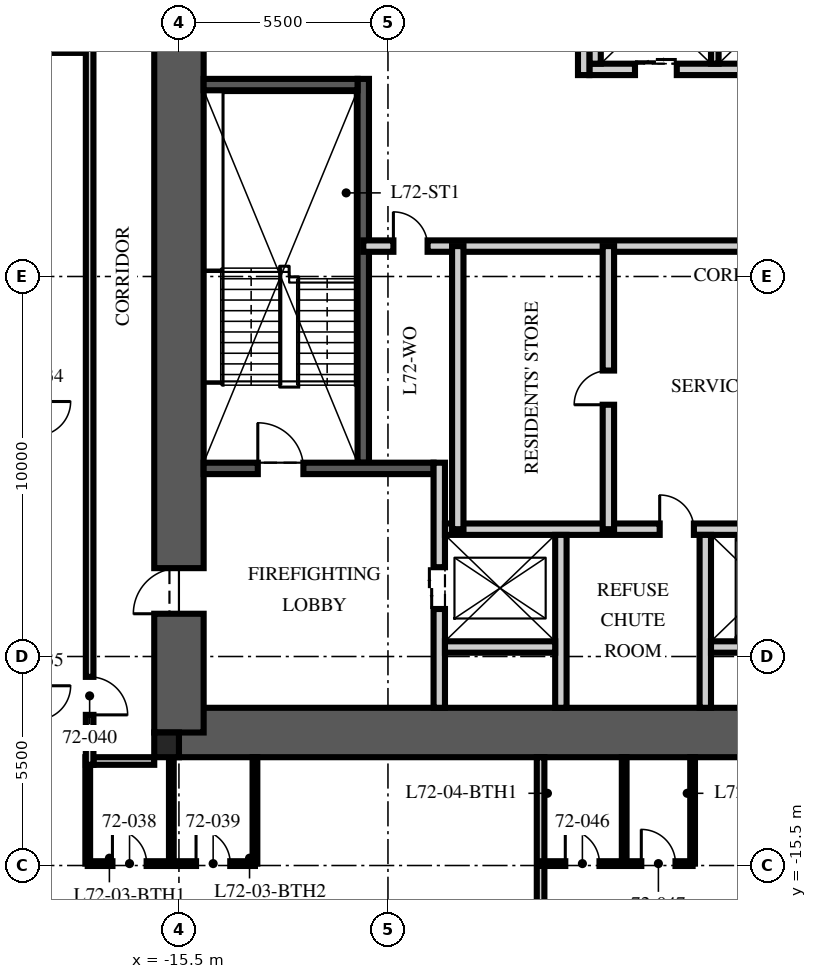
"""IFC4 building model, lengths in metres.
Left out: names, types, materials, properties, quantities, classifications, styles, units other than length and angle.
Written with IfcOpenShell. Run it as: python <this file> out.ifc"""

import sys

from ifc_helpers import new_model, si_unit, direction, frame, frame_2d, origin, origin_2d, place, context, subcontext, project, spatial, rectangle, extrude, element, fill, save


model = new_model("IFC4")
c1 = context("Model", 3, precision=1e-05, world=origin(), true_north=direction((0.0, 1.0)))
c2 = subcontext(c1, "Body", "Model", "MODEL_VIEW")
j1 = project(units=[si_unit("LENGTHUNIT", "METRE"), si_unit("PLANEANGLEUNIT", "RADIAN")], contexts=[c1])
p1 = place(None, origin())
s1 = spatial("IfcSite", under=j1, at=p1, CompositionType="ELEMENT")
p2 = place(p1, origin())
s2 = spatial("IfcBuilding", under=s1, at=p2, CompositionType="ELEMENT")
p3 = place(p2, frame((0.0, 0.0, 289.5)))
s3 = spatial("IfcBuildingStorey", under=s2, at=p3, CompositionType="ELEMENT", Elevation=289.5)
p4 = place(p3, frame((-15.5, -12.0, -0.25), z_axis=(0.0, 0.0, 1.0), x_axis=(1.0, 0.0, 0.0)))
e1 = element("IfcWall", 1, at=p4, inside=s3, PredefinedType="SHEAR", context=c2, shape_type="SweptSolid", body=[
    extrude(rectangle(XDim=31.0, YDim=1.3, at=frame_2d((15.5, 0.0))), origin(), (0.0, 0.0, 1.0), 3.75),
])
p5 = place(p3, frame((-15.5, -12.0, -0.25), z_axis=(0.0, 0.0, 1.0), x_axis=(0.0, 1.0, 0.0)))
e2 = element("IfcWall", 2, at=p5, inside=s3, PredefinedType="SHEAR", context=c2, shape_type="SweptSolid", body=[
    extrude(rectangle(XDim=24.0, YDim=1.3, at=frame_2d((12.0, 0.0))), origin(), (0.0, 0.0, 1.0), 3.75),
])
p6 = place(p5, frame((3.125, 0.0, 0.25)))
e3 = element("IfcOpeningElement", 3, at=p6, cuts=e2, PredefinedType="OPENING", context=c2, shape_type="SweptSolid", body=[
    extrude(rectangle(XDim=1.2, YDim=2.1, at=frame_2d((0.6, 1.05))), frame((0.0, 0.66, 0.0), z_axis=(0.0, -1.0, 0.0), x_axis=(1.0, 0.0, 0.0)), (0.0, 0.0, 1.0), 1.32),
])
p7 = place(p5, frame((19.375, 0.0, 0.25)))
e4 = element("IfcOpeningElement", 4, at=p7, cuts=e2, PredefinedType="OPENING", context=c2, shape_type="SweptSolid", body=[
    extrude(rectangle(XDim=1.8, YDim=2.1, at=frame_2d((0.9, 1.05))), frame((0.0, 0.66, 0.0), z_axis=(0.0, -1.0, 0.0), x_axis=(1.0, 0.0, 0.0)), (0.0, 0.0, 1.0), 1.32),
])
p8 = place(p3, frame((-15.825, -12.325, -0.25), z_axis=(0.0, 0.0, 1.0), x_axis=(1.0, 0.0, 0.0)))
e5 = element("IfcColumn", 5, at=p8, inside=s3, PredefinedType="COLUMN", context=c2, shape_type="SweptSolid", body=[
    extrude(rectangle(XDim=0.65, YDim=0.65, at=origin_2d()), origin(), (0.0, 0.0, 1.0), 3.75),
])
p9 = place(p3, frame((-10.65, -4.9, 0.0), z_axis=(0.0, 0.0, 1.0), x_axis=(0.0, 1.0, 0.0)))
e6 = element("IfcWall", 6, at=p9, inside=s3, PredefinedType="SOLIDWALL", context=c2, shape_type="SweptSolid", body=[
    extrude(rectangle(XDim=10.1, YDim=0.3, at=frame_2d((5.05, 0.0))), origin(), (0.0, 0.0, 1.0), 3.5),
])
p10 = place(p3, frame((-14.85, -5.05, 0.0), z_axis=(0.0, 0.0, 1.0), x_axis=(1.0, 0.0, 0.0)))
e7 = element("IfcWall", 7, at=p10, inside=s3, PredefinedType="SOLIDWALL", context=c2, shape_type="SweptSolid", body=[
    extrude(rectangle(XDim=6.05, YDim=0.3, at=frame_2d((3.025, 0.0))), origin(), (0.0, 0.0, 1.0), 3.5),
])
p11 = place(p10, frame((1.425, 0.0, 0.0)))
e8 = element("IfcOpeningElement", 8, at=p11, cuts=e7, PredefinedType="OPENING", context=c2, shape_type="SweptSolid", body=[
    extrude(rectangle(XDim=1.2, YDim=2.1, at=frame_2d((0.6, 1.05))), frame((0.0, 0.16, 0.0), z_axis=(0.0, -1.0, 0.0), x_axis=(1.0, 0.0, 0.0)), (0.0, 0.0, 1.0), 0.32),
])
p12 = place(p3, frame((-14.85, 5.05, 0.0), z_axis=(0.0, 0.0, 1.0), x_axis=(1.0, 0.0, 0.0)))
e9 = element("IfcWall", 9, at=p12, inside=s3, PredefinedType="SOLIDWALL", context=c2, shape_type="SweptSolid", body=[
    extrude(rectangle(XDim=4.05, YDim=0.3, at=frame_2d((2.025, 0.0))), origin(), (0.0, 0.0, 1.0), 3.5),
])
p13 = place(p3, frame((-8.65, -11.35, 0.0), z_axis=(0.0, 0.0, 1.0), x_axis=(0.0, 1.0, 0.0)))
e10 = element("IfcWall", 10, at=p13, inside=s3, PredefinedType="PARTITIONING", context=c2, shape_type="SweptSolid", body=[
    extrude(rectangle(XDim=6.45, YDim=0.3, at=frame_2d((3.225, 0.0))), origin(), (0.0, 0.0, 1.0), 3.5),
])
p14 = place(p13, frame((2.6, 0.0, 0.0)))
e11 = element("IfcOpeningElement", 11, at=p14, cuts=e10, PredefinedType="OPENING", context=c2, shape_type="SweptSolid", body=[
    extrude(rectangle(XDim=1.1, YDim=2.1, at=frame_2d((0.55, 1.05))), frame((0.0, 0.16, 0.0), z_axis=(0.0, -1.0, 0.0), x_axis=(1.0, 0.0, 0.0)), (0.0, 0.0, 1.0), 0.32),
])
p15 = place(p3, frame((-8.5, -6.65, 0.0), z_axis=(0.0, 0.0, 1.0), x_axis=(1.0, 0.0, 0.0)))
e12 = element("IfcWall", 12, at=p15, inside=s3, PredefinedType="PARTITIONING", context=c2, shape_type="SweptSolid", body=[
    extrude(rectangle(XDim=17.0, YDim=0.3, at=frame_2d((8.5, 0.0))), origin(), (0.0, 0.0, 1.0), 3.5),
])
p16 = place(p15, frame((7.8, 0.0, 0.0)))
e13 = element("IfcOpeningElement", 13, at=p16, cuts=e12, PredefinedType="OPENING", context=c2, shape_type="SweptSolid", body=[
    extrude(rectangle(XDim=1.3, YDim=2.4, at=frame_2d((0.65, 1.2))), frame((0.0, 0.16, 0.0), z_axis=(0.0, -1.0, 0.0), x_axis=(1.0, 0.0, 0.0)), (0.0, 0.0, 1.0), 0.32),
])
p17 = place(p15, frame((5.65, 0.0, 0.0)))
e14 = element("IfcOpeningElement", 14, at=p17, cuts=e12, PredefinedType="OPENING", context=c2, shape_type="SweptSolid", body=[
    extrude(rectangle(XDim=0.9, YDim=2.1, at=frame_2d((0.45, 1.05))), frame((0.0, 0.16, 0.0), z_axis=(0.0, -1.0, 0.0), x_axis=(1.0, 0.0, 0.0)), (0.0, 0.0, 1.0), 0.32),
])
p18 = place(p15, frame((10.4, 0.0, 0.0)))
e15 = element("IfcOpeningElement", 15, at=p18, cuts=e12, PredefinedType="OPENING", context=c2, shape_type="SweptSolid", body=[
    extrude(rectangle(XDim=0.9, YDim=2.1, at=frame_2d((0.45, 1.05))), frame((0.0, 0.16, 0.0), z_axis=(0.0, -1.0, 0.0), x_axis=(1.0, 0.0, 0.0)), (0.0, 0.0, 1.0), 0.32),
])
for number, where, z_axis, x_axis in (
    (16, (-5.45, -11.35, 0.0), (0.0, 0.0, 1.0), (0.0, 1.0, 0.0)),
    (17, (-1.65, -11.35, 0.0), (0.0, 0.0, 1.0), (0.0, 1.0, 0.0)),
):
    element("IfcWall", number, at=place(p3, frame(where, z_axis=z_axis, x_axis=x_axis)), inside=s3, PredefinedType="PARTITIONING", context=c2, shape_type="SweptSolid", body=[
        extrude(rectangle(XDim=4.55, YDim=0.3, at=frame_2d((2.275, 0.0))), origin(), (0.0, 0.0, 1.0), 3.5),
    ])
for number, where, z_axis, x_axis in (
    (18, (-8.5, -9.75, 0.0), (0.0, 0.0, 1.0), (1.0, 0.0, 0.0)),
    (19, (-1.5, -9.75, 0.0), (0.0, 0.0, 1.0), (1.0, 0.0, 0.0)),
):
    element("IfcWall", number, at=place(p3, frame(where, z_axis=z_axis, x_axis=x_axis)), inside=s3, PredefinedType="PARTITIONING", context=c2, shape_type="SweptSolid", body=[
        extrude(rectangle(XDim=2.9, YDim=0.3, at=frame_2d((1.45, 0.0))), origin(), (0.0, 0.0, 1.0), 3.5),
    ])
p19 = place(p3, frame((-4.7, 5.45, 0.0), z_axis=(0.0, 0.0, 1.0), x_axis=(1.0, 0.0, 0.0)))
e20 = element("IfcWall", 20, at=p19, inside=s3, PredefinedType="PARTITIONING", context=c2, shape_type="SweptSolid", body=[
    extrude(rectangle(XDim=9.7, YDim=0.3, at=frame_2d((4.85, 0.0))), origin(), (0.0, 0.0, 1.0), 3.5),
])
p20 = place(p19, frame((1.2, 0.0, 0.0)))
e21 = element("IfcOpeningElement", 21, at=p20, cuts=e20, PredefinedType="OPENING", context=c2, shape_type="SweptSolid", body=[
    extrude(rectangle(XDim=1.1, YDim=2.1, at=frame_2d((0.55, 1.05))), frame((0.0, 0.16, 0.0), z_axis=(0.0, -1.0, 0.0), x_axis=(1.0, 0.0, 0.0)), (0.0, 0.0, 1.0), 0.32),
])
p21 = place(p19, frame((4.3, 0.0, 0.0)))
e22 = element("IfcOpeningElement", 22, at=p21, cuts=e20, PredefinedType="OPENING", context=c2, shape_type="SweptSolid", body=[
    extrude(rectangle(XDim=1.1, YDim=2.1, at=frame_2d((0.55, 1.05))), frame((0.0, 0.16, 0.0), z_axis=(0.0, -1.0, 0.0), x_axis=(1.0, 0.0, 0.0)), (0.0, 0.0, 1.0), 0.32),
])
p22 = place(p19, frame((7.4, 0.0, 0.0)))
e23 = element("IfcOpeningElement", 23, at=p22, cuts=e20, PredefinedType="OPENING", context=c2, shape_type="SweptSolid", body=[
    extrude(rectangle(XDim=1.1, YDim=2.1, at=frame_2d((0.55, 1.05))), frame((0.0, 0.16, 0.0), z_axis=(0.0, -1.0, 0.0), x_axis=(1.0, 0.0, 0.0)), (0.0, 0.0, 1.0), 0.32),
])
p23 = place(p3, frame((-4.55, 5.6, 0.0), z_axis=(0.0, 0.0, 1.0), x_axis=(0.0, 1.0, 0.0)))
e24 = element("IfcWall", 24, at=p23, inside=s3, PredefinedType="PARTITIONING", context=c2, shape_type="SweptSolid", body=[
    extrude(rectangle(XDim=2.8, YDim=0.3, at=frame_2d((1.4, 0.0))), origin(), (0.0, 0.0, 1.0), 3.5),
])
p24 = place(p3, frame((-1.4, 5.6, 0.0), z_axis=(0.0, 0.0, 1.0), x_axis=(0.0, 1.0, 0.0)))
e25 = element("IfcWall", 25, at=p24, inside=s3, PredefinedType="PARTITIONING", context=c2, shape_type="SweptSolid", body=[
    extrude(rectangle(XDim=2.8, YDim=0.2, at=frame_2d((1.4, 0.0))), origin(), (0.0, 0.0, 1.0), 3.5),
])
p25 = place(p3, frame((-10.65, 0.8, 0.0), z_axis=(0.0, 0.0, 1.0), x_axis=(1.0, 0.0, 0.0)))
e26 = element("IfcWall", 26, at=p25, inside=s3, PredefinedType="PARTITIONING", context=c2, shape_type="SweptSolid", body=[
    extrude(rectangle(XDim=21.3, YDim=0.3, at=frame_2d((10.65, 0.0))), origin(), (0.0, 0.0, 1.0), 3.5),
])
p26 = place(p25, frame((10.05, 0.0, 0.0)))
e27 = element("IfcOpeningElement", 27, at=p26, cuts=e26, PredefinedType="OPENING", context=c2, shape_type="SweptSolid", body=[
    extrude(rectangle(XDim=1.2, YDim=2.1, at=frame_2d((0.6, 1.05))), frame((0.0, 0.16, 0.0), z_axis=(0.0, -1.0, 0.0), x_axis=(1.0, 0.0, 0.0)), (0.0, 0.0, 1.0), 0.32),
])
p27 = place(p25, frame((0.793, 0.0, 0.0)))
e28 = element("IfcOpeningElement", 28, at=p27, cuts=e26, PredefinedType="OPENING", context=c2, shape_type="SweptSolid", body=[
    extrude(rectangle(XDim=0.9, YDim=2.1, at=frame_2d((0.45, 1.05))), frame((0.0, 0.16, 0.0), z_axis=(0.0, -1.0, 0.0), x_axis=(1.0, 0.0, 0.0)), (0.0, 0.0, 1.0), 0.32),
])
p28 = place(p3, frame((-4.2, -6.65, 0.0), z_axis=(0.0, 0.0, 1.0), x_axis=(0.0, 1.0, 0.0)))
e29 = element("IfcWall", 29, at=p28, inside=s3, PredefinedType="PARTITIONING", context=c2, shape_type="SweptSolid", body=[
    extrude(rectangle(XDim=7.45, YDim=0.3, at=frame_2d((3.725, 0.0))), origin(), (0.0, 0.0, 1.0), 3.5),
])
p29 = place(p28, frame((3.275, 0.0, 0.0)))
e30 = element("IfcOpeningElement", 30, at=p29, cuts=e29, PredefinedType="OPENING", context=c2, shape_type="SweptSolid", body=[
    extrude(rectangle(XDim=0.9, YDim=2.1, at=frame_2d((0.45, 1.05))), frame((0.0, 0.16, 0.0), z_axis=(0.0, -1.0, 0.0), x_axis=(1.0, 0.0, 0.0)), (0.0, 0.0, 1.0), 0.32),
])
p30 = place(p3, frame((-8.163, -6.65, 0.0), z_axis=(0.0, 0.0, 1.0), x_axis=(0.0, 1.0, 0.0)))
e31 = element("IfcWall", 31, at=p30, inside=s3, PredefinedType="PARTITIONING", context=c2, shape_type="SweptSolid", body=[
    extrude(rectangle(XDim=7.45, YDim=0.3, at=frame_2d((3.725, 0.0))), origin(), (0.0, 0.0, 1.0), 3.5),
])
p31 = place(p3, frame((-4.85, 5.3, 0.0), z_axis=(0.0, 0.0, 1.0), x_axis=(0.0, 1.0, 0.0)))
e32 = element("IfcWall", 32, at=p31, inside=s3, PredefinedType="PARTITIONING", context=c2, shape_type="SweptSolid", body=[
    extrude(rectangle(XDim=6.05, YDim=0.3, at=frame_2d((3.025, 0.0))), origin(), (0.0, 0.0, 1.0), 3.5),
])
p32 = place(p31, frame((4.225, 0.0, 0.0)))
e33 = element("IfcOpeningElement", 33, at=p32, cuts=e32, PredefinedType="OPENING", context=c2, shape_type="SweptSolid", body=[
    extrude(rectangle(XDim=0.9, YDim=2.1, at=frame_2d((0.45, 1.05))), frame((0.0, 0.16, 0.0), z_axis=(0.0, -1.0, 0.0), x_axis=(1.0, 0.0, 0.0)), (0.0, 0.0, 1.0), 0.32),
])
p33 = place(p3, frame((-16.15, -12.75, 0.0), z_axis=(0.0, 0.0, 1.0), x_axis=(-1.0, 0.0, 0.0)))
e34 = element("IfcWall", 34, at=p33, inside=s3, PredefinedType="PARTITIONING", context=c2, shape_type="SweptSolid", body=[
    extrude(rectangle(XDim=1.6, YDim=0.2, at=frame_2d((0.8, 0.0))), origin(), (0.0, 0.0, 1.0), 2.6),
])
p34 = place(p3, frame((-17.95, 5.984, 0.0), z_axis=(0.0, 0.0, 1.0), x_axis=(-1.0, 0.0, 0.0)))
e35 = element("IfcWall", 35, at=p34, inside=s3, PredefinedType="PARTITIONING", context=c2, shape_type="SweptSolid", body=[
    extrude(rectangle(XDim=5.8, YDim=0.2, at=frame_2d((2.9, 0.0))), origin(), (0.0, 0.0, 1.0), 3.01),
])
p35 = place(p3, frame((-5.984, -12.65, 0.0), z_axis=(0.0, 0.0, 1.0), x_axis=(0.0, -1.0, 0.0)))
e36 = element("IfcWall", 36, at=p35, inside=s3, PredefinedType="PARTITIONING", context=c2, shape_type="SweptSolid", body=[
    extrude(rectangle(XDim=11.1, YDim=0.2, at=frame_2d((5.55, 0.0))), origin(), (0.0, 0.0, 1.0), 3.01),
])
p36 = place(p3, frame((-17.9, -15.45, 0.0), z_axis=(0.0, 0.0, 1.0), x_axis=(1.0, 0.0, 0.0)))
e37 = element("IfcWall", 37, at=p36, inside=s3, PredefinedType="PARTITIONING", context=c2, shape_type="SweptSolid", body=[
    extrude(rectangle(XDim=4.4, YDim=0.125, at=frame_2d((2.2, 0.0))), origin(), (0.0, 0.0, 1.0), 2.6),
])
p37 = place(p36, frame((0.65, 0.0, 0.0)))
e38 = element("IfcOpeningElement", 38, at=p37, cuts=e37, PredefinedType="OPENING", context=c2, shape_type="SweptSolid", body=[
    extrude(rectangle(XDim=0.9, YDim=2.1, at=frame_2d((0.45, 1.05))), frame((0.0, 0.073, 0.0), z_axis=(0.0, -1.0, 0.0), x_axis=(1.0, 0.0, 0.0)), (0.0, 0.0, 1.0), 0.145),
])
p38 = place(p36, frame((2.85, 0.0, 0.0)))
e39 = element("IfcOpeningElement", 39, at=p38, cuts=e37, PredefinedType="OPENING", context=c2, shape_type="SweptSolid", body=[
    extrude(rectangle(XDim=0.9, YDim=2.1, at=frame_2d((0.45, 1.05))), frame((0.0, 0.073, 0.0), z_axis=(0.0, -1.0, 0.0), x_axis=(1.0, 0.0, 0.0)), (0.0, 0.0, 1.0), 0.145),
])
p39 = place(p3, frame((-17.9, -12.65, 0.0), z_axis=(0.0, 0.0, 1.0), x_axis=(0.0, -1.0, 0.0)))
e40 = element("IfcWall", 40, at=p39, inside=s3, PredefinedType="PARTITIONING", context=c2, shape_type="SweptSolid", body=[
    extrude(rectangle(XDim=2.8, YDim=0.125, at=frame_2d((1.4, 0.0))), origin(), (0.0, 0.0, 1.0), 2.9),
])
p40 = place(p3, frame((-15.7, -12.65, 0.0), z_axis=(0.0, 0.0, 1.0), x_axis=(0.0, -1.0, 0.0)))
e41 = element("IfcWall", 41, at=p40, inside=s3, PredefinedType="PARTITIONING", context=c2, shape_type="SweptSolid", body=[
    extrude(rectangle(XDim=2.8, YDim=0.125, at=frame_2d((1.4, 0.0))), origin(), (0.0, 0.0, 1.0), 2.6),
])
p41 = place(p3, frame((-13.5, -12.65, 0.0), z_axis=(0.0, 0.0, 1.0), x_axis=(0.0, -1.0, 0.0)))
e42 = element("IfcWall", 42, at=p41, inside=s3, PredefinedType="PARTITIONING", context=c2, shape_type="SweptSolid", body=[
    extrude(rectangle(XDim=2.8, YDim=0.125, at=frame_2d((1.4, 0.0))), origin(), (0.0, 0.0, 1.0), 3.5),
])
p42 = place(p3, frame((-5.984, -15.45, 0.0), z_axis=(0.0, 0.0, 1.0), x_axis=(1.0, 0.0, 0.0)))
e43 = element("IfcWall", 43, at=p42, inside=s3, PredefinedType="PARTITIONING", context=c2, shape_type="SweptSolid", body=[
    extrude(rectangle(XDim=4.0, YDim=0.125, at=frame_2d((2.0, 0.0))), origin(), (0.0, 0.0, 1.0), 2.91),
])
p43 = place(p42, frame((0.65, 0.0, 0.0)))
e44 = element("IfcOpeningElement", 44, at=p43, cuts=e43, PredefinedType="OPENING", context=c2, shape_type="SweptSolid", body=[
    extrude(rectangle(XDim=0.9, YDim=2.1, at=frame_2d((0.45, 1.05))), frame((0.0, 0.073, 0.0), z_axis=(0.0, -1.0, 0.0), x_axis=(1.0, 0.0, 0.0)), (0.0, 0.0, 1.0), 0.145),
])
p44 = place(p42, frame((2.65, 0.0, 0.0)))
e45 = element("IfcOpeningElement", 45, at=p44, cuts=e43, PredefinedType="OPENING", context=c2, shape_type="SweptSolid", body=[
    extrude(rectangle(XDim=0.9, YDim=2.1, at=frame_2d((0.45, 1.05))), frame((0.0, 0.073, 0.0), z_axis=(0.0, -1.0, 0.0), x_axis=(1.0, 0.0, 0.0)), (0.0, 0.0, 1.0), 0.145),
])
p45 = place(p3, frame((-3.784, -12.65, 0.0), z_axis=(0.0, 0.0, 1.0), x_axis=(0.0, -1.0, 0.0)))
e46 = element("IfcWall", 46, at=p45, inside=s3, PredefinedType="PARTITIONING", context=c2, shape_type="SweptSolid", body=[
    extrude(rectangle(XDim=2.8, YDim=0.125, at=frame_2d((1.4, 0.0))), origin(), (0.0, 0.0, 1.0), 2.91),
])
p46 = place(p3, frame((-1.984, -12.65, 0.0), z_axis=(0.0, 0.0, 1.0), x_axis=(0.0, -1.0, 0.0)))
e47 = element("IfcWall", 47, at=p46, inside=s3, PredefinedType="PARTITIONING", context=c2, shape_type="SweptSolid", body=[
    extrude(rectangle(XDim=2.8, YDim=0.125, at=frame_2d((1.4, 0.0))), origin(), (0.0, 0.0, 1.0), 3.5),
])
p47 = place(p3, frame((-17.85, 12.85, 0.0), z_axis=(0.0, 0.0, 1.0), x_axis=(0.0, -1.0, 0.0)))
e48 = element("IfcWall", 48, at=p47, inside=s3, PredefinedType="PARTITIONING", context=c2, shape_type="SweptSolid", body=[
    extrude(rectangle(XDim=25.7, YDim=0.2, at=frame_2d((12.85, 0.0))), origin(), (0.0, 0.0, 1.0), 2.9),
])
p48 = place(p47, frame((5.1, 0.0, 0.0)))
e49 = element("IfcOpeningElement", 49, at=p48, cuts=e48, PredefinedType="OPENING", context=c2, shape_type="SweptSolid", body=[
    extrude(rectangle(XDim=1.0, YDim=2.2, at=frame_2d((0.5, 1.1))), frame((0.0, 0.11, 0.0), z_axis=(0.0, -1.0, 0.0), x_axis=(1.0, 0.0, 0.0)), (0.0, 0.0, 1.0), 0.22),
])
p49 = place(p47, frame((23.386, 0.0, 0.0)))
e50 = element("IfcOpeningElement", 50, at=p49, cuts=e48, PredefinedType="OPENING", context=c2, shape_type="SweptSolid", body=[
    extrude(rectangle(XDim=1.0, YDim=2.2, at=frame_2d((0.5, 1.1))), frame((0.0, 0.11, 0.0), z_axis=(0.0, -1.0, 0.0), x_axis=(1.0, 0.0, 0.0)), (0.0, 0.0, 1.0), 0.22),
])
p50 = place(p11, origin())
e51 = element("IfcDoor", 51, at=p50, inside=s3, OperationType="SINGLE_SWING_LEFT", PredefinedType="DOOR", context=c2, shape_type="SweptSolid", body=[
    extrude(rectangle(XDim=1.2, YDim=2.1, at=frame_2d((0.6, 1.05))), frame((0.0, 0.025, 0.0), z_axis=(0.0, -1.0, 0.0), x_axis=(1.0, 0.0, 0.0)), (0.0, 0.0, 1.0), 0.05),
])
fill(e8, e51)
p51 = place(p6, origin())
e52 = element("IfcDoor", 52, at=p51, inside=s3, OperationType="SINGLE_SWING_LEFT", PredefinedType="DOOR", context=c2, shape_type="SweptSolid", body=[
    extrude(rectangle(XDim=1.2, YDim=2.1, at=frame_2d((0.6, 1.05))), frame((0.0, 0.025, 0.0), z_axis=(0.0, -1.0, 0.0), x_axis=(1.0, 0.0, 0.0)), (0.0, 0.0, 1.0), 0.05),
])
fill(e3, e52)
p52 = place(p14, origin())
e53 = element("IfcDoor", 53, at=p52, inside=s3, OperationType="DOUBLE_DOOR_SLIDING", PredefinedType="DOOR", context=c2, shape_type="SweptSolid", body=[
    extrude(rectangle(XDim=1.1, YDim=2.1, at=frame_2d((0.55, 1.05))), frame((0.0, 0.025, 0.0), z_axis=(0.0, -1.0, 0.0), x_axis=(1.0, 0.0, 0.0)), (0.0, 0.0, 1.0), 0.05),
])
fill(e11, e53)
p53 = place(p20, origin())
e54 = element("IfcDoor", 54, at=p53, inside=s3, OperationType="DOUBLE_DOOR_SLIDING", PredefinedType="DOOR", context=c2, shape_type="SweptSolid", body=[
    extrude(rectangle(XDim=1.1, YDim=2.1, at=frame_2d((0.55, 1.05))), frame((0.0, 0.025, 0.0), z_axis=(0.0, -1.0, 0.0), x_axis=(1.0, 0.0, 0.0)), (0.0, 0.0, 1.0), 0.05),
])
fill(e21, e54)
p54 = place(p17, origin())
e55 = element("IfcDoor", 55, at=p54, inside=s3, OperationType="SINGLE_SWING_LEFT", PredefinedType="DOOR", context=c2, shape_type="SweptSolid", body=[
    extrude(rectangle(XDim=0.9, YDim=2.1, at=frame_2d((0.45, 1.05))), frame((0.0, 0.025, 0.0), z_axis=(0.0, -1.0, 0.0), x_axis=(1.0, 0.0, 0.0)), (0.0, 0.0, 1.0), 0.05),
])
fill(e14, e55)
p55 = place(p29, origin())
e56 = element("IfcDoor", 56, at=p55, inside=s3, OperationType="SINGLE_SWING_LEFT", PredefinedType="DOOR", context=c2, shape_type="SweptSolid", body=[
    extrude(rectangle(XDim=0.9, YDim=2.1, at=frame_2d((0.45, 1.05))), frame((0.0, 0.025, 0.0), z_axis=(0.0, -1.0, 0.0), x_axis=(1.0, 0.0, 0.0)), (0.0, 0.0, 1.0), 0.05),
])
fill(e30, e56)
p56 = place(p27, origin())
e57 = element("IfcDoor", 57, at=p56, inside=s3, OperationType="SINGLE_SWING_LEFT", PredefinedType="DOOR", context=c2, shape_type="SweptSolid", body=[
    extrude(rectangle(XDim=0.9, YDim=2.1, at=frame_2d((0.45, 1.05))), frame((0.0, 0.025, 0.0), z_axis=(0.0, -1.0, 0.0), x_axis=(1.0, 0.0, 0.0)), (0.0, 0.0, 1.0), 0.05),
])
fill(e28, e57)
p57 = place(p37, origin())
e58 = element("IfcDoor", 58, at=p57, inside=s3, OperationType="SINGLE_SWING_LEFT", PredefinedType="DOOR", context=c2, shape_type="SweptSolid", body=[
    extrude(rectangle(XDim=0.9, YDim=2.1, at=frame_2d((0.45, 1.05))), frame((0.0, 0.025, 0.0), z_axis=(0.0, -1.0, 0.0), x_axis=(1.0, 0.0, 0.0)), (0.0, 0.0, 1.0), 0.05),
])
fill(e38, e58)
p58 = place(p38, origin())
e59 = element("IfcDoor", 59, at=p58, inside=s3, OperationType="SINGLE_SWING_LEFT", PredefinedType="DOOR", context=c2, shape_type="SweptSolid", body=[
    extrude(rectangle(XDim=0.9, YDim=2.1, at=frame_2d((0.45, 1.05))), frame((0.0, 0.025, 0.0), z_axis=(0.0, -1.0, 0.0), x_axis=(1.0, 0.0, 0.0)), (0.0, 0.0, 1.0), 0.05),
])
fill(e39, e59)
p59 = place(p49, origin())
e60 = element("IfcDoor", 60, at=p59, inside=s3, OperationType="SINGLE_SWING_RIGHT", PredefinedType="DOOR", context=c2, shape_type="SweptSolid", body=[
    extrude(rectangle(XDim=1.0, YDim=2.2, at=frame_2d((0.5, 1.1))), frame((0.0, 0.025, 0.0), z_axis=(0.0, -1.0, 0.0), x_axis=(1.0, 0.0, 0.0)), (0.0, 0.0, 1.0), 0.05),
])
fill(e50, e60)
p60 = place(p43, origin())
e61 = element("IfcDoor", 61, at=p60, inside=s3, OperationType="SINGLE_SWING_LEFT", PredefinedType="DOOR", context=c2, shape_type="SweptSolid", body=[
    extrude(rectangle(XDim=0.9, YDim=2.1, at=frame_2d((0.45, 1.05))), frame((0.0, 0.025, 0.0), z_axis=(0.0, -1.0, 0.0), x_axis=(1.0, 0.0, 0.0)), (0.0, 0.0, 1.0), 0.05),
])
fill(e44, e61)
p61 = place(p44, origin())
e62 = element("IfcDoor", 62, at=p61, inside=s3, OperationType="SINGLE_SWING_LEFT", PredefinedType="DOOR", context=c2, shape_type="SweptSolid", body=[
    extrude(rectangle(XDim=0.9, YDim=2.1, at=frame_2d((0.45, 1.05))), frame((0.0, 0.025, 0.0), z_axis=(0.0, -1.0, 0.0), x_axis=(1.0, 0.0, 0.0)), (0.0, 0.0, 1.0), 0.05),
])
fill(e45, e62)
save(model, sys.argv[1])
